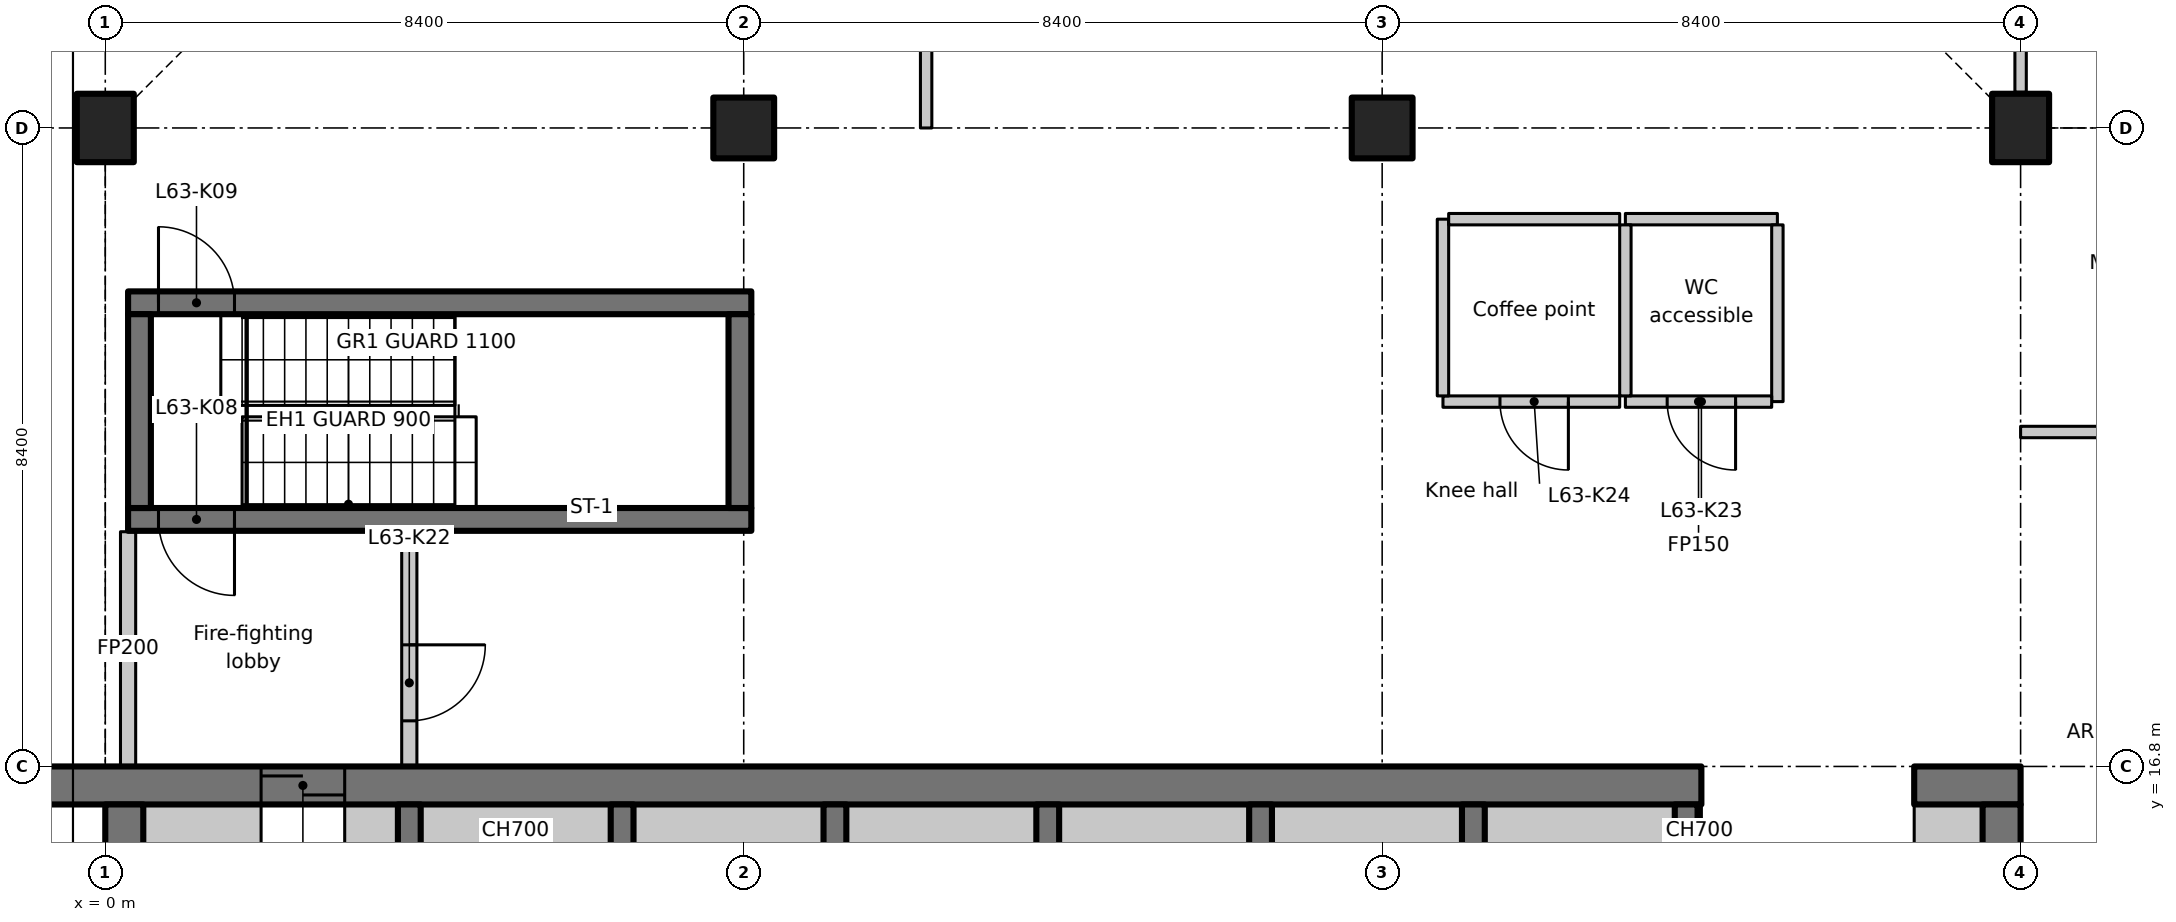
"""IFC4 building model, lengths in metres.
Left out: names, types, materials, properties, quantities, classifications, styles, units other than length and angle.
Written with IfcOpenShell. Run it as: python <this file> out.ifc"""

import sys

from ifc_helpers import new_model, si_unit, direction, frame, frame_2d, origin, origin_2d, place, context, subcontext, project, spatial, polyline, rectangle, outline, extrude, element, fill, save


model = new_model("IFC4")
c1 = context("Model", 3, precision=1e-05, world=origin(), true_north=direction((0.0, 1.0)))
c2 = subcontext(c1, "Body", "Model", "MODEL_VIEW")
j1 = project(units=[si_unit("LENGTHUNIT", "METRE"), si_unit("PLANEANGLEUNIT", "RADIAN")], contexts=[c1])
p1 = place(None, origin())
s1 = spatial("IfcSite", under=j1, at=p1, CompositionType="ELEMENT")
p2 = place(p1, origin())
s2 = spatial("IfcBuilding", under=s1, at=p2, CompositionType="ELEMENT")
p3 = place(p2, frame((0.0, 0.0, 248.1)))
s3 = spatial("IfcBuildingStorey", under=s2, at=p3, CompositionType="ELEMENT", Elevation=248.1)
p4 = place(p3, frame((0.0, 25.2, 0.0), z_axis=(0.0, 0.0, 1.0), x_axis=(1.0, 0.0, 0.0)))
e1 = element("IfcColumn", 1, at=p4, inside=s3, PredefinedType="COLUMN", context=c2, shape_type="SweptSolid", body=[
    extrude(rectangle(XDim=0.75, YDim=0.9, at=origin_2d()), origin(), (0.0, 0.0, 1.0), 3.35),
])
for number, where, z_axis, x_axis in (
    (2, (8.4, 25.2, 0.0), (0.0, 0.0, 1.0), (1.0, 0.0, 0.0)),
    (3, (16.8, 25.2, 0.0), (0.0, 0.0, 1.0), (1.0, 0.0, 0.0)),
):
    element("IfcColumn", number, at=place(p3, frame(where, z_axis=z_axis, x_axis=x_axis)), inside=s3, PredefinedType="COLUMN", context=c2, shape_type="SweptSolid", body=[
        extrude(rectangle(XDim=0.8, YDim=0.8, at=origin_2d()), origin(), (0.0, 0.0, 1.0), 3.35),
    ])
p5 = place(p3, frame((25.2, 25.2, 0.0), z_axis=(0.0, 0.0, 1.0), x_axis=(1.0, 0.0, 0.0)))
e4 = element("IfcColumn", 4, at=p5, inside=s3, PredefinedType="COLUMN", context=c2, shape_type="SweptSolid", body=[
    extrude(rectangle(XDim=0.75, YDim=0.9, at=origin_2d()), origin(), (0.0, 0.0, 1.0), 3.35),
])
p6 = place(p3, frame((-1.1, 16.55, 0.0), z_axis=(0.0, 0.0, 1.0), x_axis=(1.0, 0.0, 0.0)))
e5 = element("IfcWall", 5, at=p6, inside=s3, PredefinedType="SHEAR", context=c2, shape_type="SweptSolid", body=[
    extrude(rectangle(XDim=22.1, YDim=0.5, at=frame_2d((11.05, 0.0))), origin(), (0.0, 0.0, 1.0), 3.35),
])
p7 = place(p6, frame((3.15, 0.0, 0.0)))
e6 = element("IfcOpeningElement", 6, at=p7, cuts=e5, PredefinedType="OPENING", context=c2, shape_type="SweptSolid", body=[
    extrude(rectangle(XDim=1.1, YDim=2.3, at=frame_2d((0.55, 1.15))), frame((0.0, 0.26, 0.0), z_axis=(0.0, -1.0, 0.0), x_axis=(1.0, 0.0, 0.0)), (0.0, 0.0, 1.0), 0.52),
])
p8 = place(p3, frame((23.8, 16.55, 0.0), z_axis=(0.0, 0.0, 1.0), x_axis=(1.0, 0.0, 0.0)))
e7 = element("IfcWall", 7, at=p8, inside=s3, PredefinedType="SHEAR", context=c2, shape_type="SweptSolid", body=[
    extrude(rectangle(XDim=1.4, YDim=0.5, at=frame_2d((0.7, 0.0))), origin(), (0.0, 0.0, 1.0), 3.35),
])
p9 = place(p3, frame((0.25, 7.436, 0.0), z_axis=(0.0, 0.0, 1.0), x_axis=(0.0, 1.0, 0.0)))
e8 = element("IfcWall", 8, at=p9, inside=s3, PredefinedType="SHEAR", context=c2, shape_type="SweptSolid", body=[
    extrude(rectangle(XDim=8.864, YDim=0.5, at=frame_2d((4.432, 0.0))), origin(), (0.0, 0.0, 1.0), 3.35),
])
p10 = place(p3, frame((24.95, 12.6, 0.0), z_axis=(0.0, 0.0, 1.0), x_axis=(0.0, 1.0, 0.0)))
e9 = element("IfcWall", 9, at=p10, inside=s3, PredefinedType="SHEAR", context=c2, shape_type="SweptSolid", body=[
    extrude(rectangle(XDim=3.7, YDim=0.5, at=frame_2d((1.85, 0.0))), origin(), (0.0, 0.0, 1.0), 3.35),
])
p11 = place(p3, frame((0.5, 15.95, 0.0), z_axis=(0.0, 0.0, 1.0), x_axis=(1.0, 0.0, 0.0)))
e10 = element("IfcWall", 10, at=p11, inside=s3, PredefinedType="PARTITIONING", context=c2, shape_type="SweptSolid", body=[
    extrude(rectangle(XDim=1.55, YDim=0.7, at=frame_2d((0.775, 0.0))), origin(), (0.0, 0.0, 1.0), 3.35),
])
p12 = place(p3, frame((23.8, 15.95, 0.0), z_axis=(0.0, 0.0, 1.0), x_axis=(1.0, 0.0, 0.0)))
e11 = element("IfcWall", 11, at=p12, inside=s3, PredefinedType="PARTITIONING", context=c2, shape_type="SweptSolid", body=[
    extrude(rectangle(XDim=0.9, YDim=0.7, at=frame_2d((0.45, 0.0))), origin(), (0.0, 0.0, 1.0), 3.35),
])
for number, where, z_axis, x_axis in (
    (12, (4.0, 12.95, 0.0), (0.0, 0.0, 1.0), (0.0, 1.0, 0.0)),
    (13, (6.8, 12.95, 0.0), (0.0, 0.0, 1.0), (0.0, 1.0, 0.0)),
    (14, (9.6, 12.95, 0.0), (0.0, 0.0, 1.0), (0.0, 1.0, 0.0)),
    (15, (12.4, 12.95, 0.0), (0.0, 0.0, 1.0), (0.0, 1.0, 0.0)),
    (16, (15.2, 12.95, 0.0), (0.0, 0.0, 1.0), (0.0, 1.0, 0.0)),
    (17, (18.0, 12.95, 0.0), (0.0, 0.0, 1.0), (0.0, 1.0, 0.0)),
    (18, (20.8, 12.95, 0.0), (0.0, 0.0, 1.0), (0.0, 1.0, 0.0)),
):
    element("IfcWall", number, at=place(p3, frame(where, z_axis=z_axis, x_axis=x_axis)), inside=s3, PredefinedType="SHEAR", context=c2, shape_type="SweptSolid", body=[
        extrude(rectangle(XDim=3.35, YDim=0.3, at=frame_2d((1.675, 0.0))), origin(), (0.0, 0.0, 1.0), 3.35),
    ])
p13 = place(p3, frame((8.5, 20.05, 0.0), z_axis=(0.0, 0.0, 1.0), x_axis=(-1.0, 0.0, 0.0)))
e19 = element("IfcWall", 19, at=p13, inside=s3, PredefinedType="SHEAR", context=c2, shape_type="SweptSolid", body=[
    extrude(rectangle(XDim=8.2, YDim=0.3, at=frame_2d((4.1, 0.0))), origin(), (0.0, 0.0, 1.0), 3.35),
])
p14 = place(p13, frame((6.8, 0.0, 0.0)))
e20 = element("IfcOpeningElement", 20, at=p14, cuts=e19, PredefinedType="OPENING", context=c2, shape_type="SweptSolid", body=[
    extrude(rectangle(XDim=1.0, YDim=2.1, at=frame_2d((0.5, 1.05))), frame((0.0, 0.16, 0.0), z_axis=(0.0, -1.0, 0.0), x_axis=(1.0, 0.0, 0.0)), (0.0, 0.0, 1.0), 0.32),
])
p15 = place(p3, frame((0.3, 22.9, 0.0), z_axis=(0.0, 0.0, 1.0), x_axis=(1.0, 0.0, 0.0)))
e21 = element("IfcWall", 21, at=p15, inside=s3, PredefinedType="SHEAR", context=c2, shape_type="SweptSolid", body=[
    extrude(rectangle(XDim=8.2, YDim=0.3, at=frame_2d((4.1, 0.0))), origin(), (0.0, 0.0, 1.0), 3.35),
])
p16 = place(p15, frame((0.4, 0.0, 0.0)))
e22 = element("IfcOpeningElement", 22, at=p16, cuts=e21, PredefinedType="OPENING", context=c2, shape_type="SweptSolid", body=[
    extrude(rectangle(XDim=1.0, YDim=2.1, at=frame_2d((0.5, 1.05))), frame((0.0, 0.16, 0.0), z_axis=(0.0, -1.0, 0.0), x_axis=(1.0, 0.0, 0.0)), (0.0, 0.0, 1.0), 0.32),
])
for number, where, z_axis, x_axis in (
    (23, (0.45, 20.2, 0.0), (0.0, 0.0, 1.0), (0.0, 1.0, 0.0)),
    (24, (8.35, 20.2, 0.0), (0.0, 0.0, 1.0), (0.0, 1.0, 0.0)),
):
    element("IfcWall", number, at=place(p3, frame(where, z_axis=z_axis, x_axis=x_axis)), inside=s3, PredefinedType="SHEAR", context=c2, shape_type="SweptSolid", body=[
        extrude(rectangle(XDim=2.55, YDim=0.3, at=frame_2d((1.275, 0.0))), origin(), (0.0, 0.0, 1.0), 3.35),
    ])
p17 = place(p3, frame((0.3, 16.812, 0.0), z_axis=(0.0, 0.0, 1.0), x_axis=(0.0, 1.0, 0.0)))
e25 = element("IfcWall", 25, at=p17, inside=s3, PredefinedType="PARTITIONING", context=c2, shape_type="SweptSolid", body=[
    extrude(rectangle(XDim=3.076, YDim=0.2, at=frame_2d((1.538, 0.0))), origin(), (0.0, 0.0, 1.0), 2.98),
])
p18 = place(p3, frame((4.0, 19.888, 0.0), z_axis=(0.0, 0.0, 1.0), x_axis=(0.0, -1.0, 0.0)))
e26 = element("IfcWall", 26, at=p18, inside=s3, PredefinedType="PARTITIONING", context=c2, shape_type="SweptSolid", body=[
    extrude(rectangle(XDim=3.076, YDim=0.2, at=frame_2d((1.538, 0.0))), origin(), (0.0, 0.0, 1.0), 3.35),
])
p19 = place(p18, frame((1.488, 0.0, 0.0)))
e27 = element("IfcOpeningElement", 27, at=p19, cuts=e26, PredefinedType="OPENING", context=c2, shape_type="SweptSolid", body=[
    extrude(rectangle(XDim=1.0, YDim=2.1, at=frame_2d((0.5, 1.05))), frame((0.0, 0.11, 0.0), z_axis=(0.0, -1.0, 0.0), x_axis=(1.0, 0.0, 0.0)), (0.0, 0.0, 1.0), 0.22),
])
p20 = place(p3, frame((20.0, 24.0, 0.0), z_axis=(0.0, 0.0, 1.0), x_axis=(1.0, 0.0, 0.0)))
e28 = element("IfcWall", 28, at=p20, inside=s3, PredefinedType="PARTITIONING", context=c2, shape_type="SweptSolid", body=[
    extrude(rectangle(XDim=2.0, YDim=0.15, at=frame_2d((1.0, 0.0))), origin(), (0.0, 0.0, 1.0), 3.35),
])
p21 = place(p3, frame((22.0, 23.925, 0.0), z_axis=(0.0, 0.0, 1.0), x_axis=(0.0, -1.0, 0.0)))
e29 = element("IfcWall", 29, at=p21, inside=s3, PredefinedType="PARTITIONING", context=c2, shape_type="SweptSolid", body=[
    extrude(rectangle(XDim=2.325, YDim=0.15, at=frame_2d((1.163, 0.0))), origin(), (0.0, 0.0, 1.0), 3.35),
])
p22 = place(p3, frame((21.925, 21.6, 0.0), z_axis=(0.0, 0.0, 1.0), x_axis=(-1.0, 0.0, 0.0)))
e30 = element("IfcWall", 30, at=p22, inside=s3, PredefinedType="PARTITIONING", context=c2, shape_type="SweptSolid", body=[
    extrude(rectangle(XDim=1.925, YDim=0.15, at=frame_2d((0.962, 0.0))), origin(), (0.0, 0.0, 1.0), 3.35),
])
p23 = place(p22, frame((0.475, 0.0, 0.0)))
e31 = element("IfcOpeningElement", 31, at=p23, cuts=e30, PredefinedType="OPENING", context=c2, shape_type="SweptSolid", body=[
    extrude(rectangle(XDim=0.9, YDim=2.1, at=frame_2d((0.45, 1.05))), frame((0.0, 0.085, 0.0), z_axis=(0.0, -1.0, 0.0), x_axis=(1.0, 0.0, 0.0)), (0.0, 0.0, 1.0), 0.17),
])
p24 = place(p3, frame((20.0, 21.675, 0.0), z_axis=(0.0, 0.0, 1.0), x_axis=(0.0, 1.0, 0.0)))
e32 = element("IfcWall", 32, at=p24, inside=s3, PredefinedType="PARTITIONING", context=c2, shape_type="SweptSolid", body=[
    extrude(rectangle(XDim=2.25, YDim=0.15, at=frame_2d((1.125, 0.0))), origin(), (0.0, 0.0, 1.0), 3.35),
])
p25 = place(p3, frame((19.925, 21.6, 0.0), z_axis=(0.0, 0.0, 1.0), x_axis=(-1.0, 0.0, 0.0)))
e33 = element("IfcWall", 33, at=p25, inside=s3, PredefinedType="PARTITIONING", context=c2, shape_type="SweptSolid", body=[
    extrude(rectangle(XDim=2.325, YDim=0.15, at=frame_2d((1.163, 0.0))), origin(), (0.0, 0.0, 1.0), 3.35),
])
p26 = place(p25, frame((0.675, 0.0, 0.0)))
e34 = element("IfcOpeningElement", 34, at=p26, cuts=e33, PredefinedType="OPENING", context=c2, shape_type="SweptSolid", body=[
    extrude(rectangle(XDim=0.9, YDim=2.1, at=frame_2d((0.45, 1.05))), frame((0.0, 0.085, 0.0), z_axis=(0.0, -1.0, 0.0), x_axis=(1.0, 0.0, 0.0)), (0.0, 0.0, 1.0), 0.17),
])
p27 = place(p3, frame((17.6, 21.675, 0.0), z_axis=(0.0, 0.0, 1.0), x_axis=(0.0, 1.0, 0.0)))
e35 = element("IfcWall", 35, at=p27, inside=s3, PredefinedType="PARTITIONING", context=c2, shape_type="SweptSolid", body=[
    extrude(rectangle(XDim=2.325, YDim=0.15, at=frame_2d((1.163, 0.0))), origin(), (0.0, 0.0, 1.0), 3.35),
])
p28 = place(p3, frame((17.675, 24.0, 0.0), z_axis=(0.0, 0.0, 1.0), x_axis=(1.0, 0.0, 0.0)))
e36 = element("IfcWall", 36, at=p28, inside=s3, PredefinedType="PARTITIONING", context=c2, shape_type="SweptSolid", body=[
    extrude(rectangle(XDim=2.25, YDim=0.15, at=frame_2d((1.125, 0.0))), origin(), (0.0, 0.0, 1.0), 3.35),
])
p29 = place(p3, frame((3.15, 15.95, 0.0), z_axis=(0.0, 0.0, 1.0), x_axis=(1.0, 0.0, 0.0)))
e37 = element("IfcWall", 37, at=p29, inside=s3, PredefinedType="PARTITIONING", context=c2, shape_type="SweptSolid", body=[
    extrude(rectangle(XDim=0.7, YDim=0.7, at=frame_2d((0.35, 0.0))), origin(), (0.0, 0.0, 1.0), 3.35),
])
for number, where, z_axis, x_axis in (
    (38, (4.15, 15.95, 0.0), (0.0, 0.0, 1.0), (1.0, 0.0, 0.0)),
    (39, (6.95, 15.95, 0.0), (0.0, 0.0, 1.0), (1.0, 0.0, 0.0)),
    (40, (9.75, 15.95, 0.0), (0.0, 0.0, 1.0), (1.0, 0.0, 0.0)),
    (41, (12.55, 15.95, 0.0), (0.0, 0.0, 1.0), (1.0, 0.0, 0.0)),
    (42, (15.35, 15.95, 0.0), (0.0, 0.0, 1.0), (1.0, 0.0, 0.0)),
    (43, (18.15, 15.95, 0.0), (0.0, 0.0, 1.0), (1.0, 0.0, 0.0)),
):
    element("IfcWall", number, at=place(p3, frame(where, z_axis=z_axis, x_axis=x_axis)), inside=s3, PredefinedType="PARTITIONING", context=c2, shape_type="SweptSolid", body=[
        extrude(rectangle(XDim=2.5, YDim=0.7, at=frame_2d((1.25, 0.0))), origin(), (0.0, 0.0, 1.0), 3.35),
    ])
p30 = place(p3, frame((20.95, 15.95, 0.0), z_axis=(0.0, 0.0, 1.0), x_axis=(1.0, 0.0, 0.0)))
e44 = element("IfcWall", 44, at=p30, inside=s3, PredefinedType="PARTITIONING", context=c2, shape_type="SweptSolid", body=[
    extrude(rectangle(XDim=0.05, YDim=0.7, at=frame_2d((0.025, 0.0))), origin(), (0.0, 0.0, 1.0), 3.35),
])
p31 = place(p3, frame((25.2, 21.2, 0.0), z_axis=(0.0, 0.0, 1.0), x_axis=(1.0, 0.0, 0.0)))
e45 = element("IfcWall", 45, at=p31, inside=s3, PredefinedType="PARTITIONING", context=c2, shape_type="SweptSolid", body=[
    extrude(rectangle(XDim=4.2, YDim=0.15, at=frame_2d((2.1, 0.0))), origin(), (0.0, 0.0, 1.0), 3.33),
])
p32 = place(p31, frame((1.5, 0.0, 0.0)))
e46 = element("IfcOpeningElement", 46, at=p32, cuts=e45, PredefinedType="OPENING", context=c2, shape_type="SweptSolid", body=[
    extrude(rectangle(XDim=1.0, YDim=2.1, at=frame_2d((0.5, 1.05))), frame((0.0, 0.085, 0.0), z_axis=(0.0, -1.0, 0.0), x_axis=(1.0, 0.0, 0.0)), (0.0, 0.0, 1.0), 0.17),
])
p33 = place(p3, frame((25.2, 25.67, 0.0), z_axis=(0.0, 0.0, 1.0), x_axis=(0.0, 1.0, 0.0)))
e47 = element("IfcWall", 47, at=p33, inside=s3, PredefinedType="PARTITIONING", context=c2, shape_type="SweptSolid", body=[
    extrude(rectangle(XDim=4.487, YDim=0.15, at=frame_2d((2.243, 0.0))), origin(), (0.0, 0.0, 1.0), 2.98),
])
p34 = place(p3, frame((10.8, 25.2, 0.0), z_axis=(0.0, 0.0, 1.0), x_axis=(0.0, 1.0, 0.0)))
e48 = element("IfcWall", 48, at=p34, inside=s3, PredefinedType="PARTITIONING", context=c2, shape_type="SweptSolid", body=[
    extrude(outline(polyline([(0.0, 0.0), (8.4, 0.0), (8.4, 2.98), (7.952, 2.98), (7.95, 3.33), (0.0, 3.33), (0.0, 0.0)])), frame((0.0, 0.075, 0.0), z_axis=(0.0, -1.0, 0.0), x_axis=(1.0, 0.0, 0.0)), (0.0, 0.0, 1.0), 0.15),
])
p35 = place(p34, frame((3.3, 0.0, 0.0)))
e49 = element("IfcOpeningElement", 49, at=p35, cuts=e48, PredefinedType="OPENING", context=c2, shape_type="SweptSolid", body=[
    extrude(rectangle(XDim=1.6, YDim=2.1, at=frame_2d((0.8, 1.05))), frame((0.0, 0.085, 0.0), z_axis=(0.0, -1.0, 0.0), x_axis=(1.0, 0.0, 0.0)), (0.0, 0.0, 1.0), 0.17),
])
p36 = place(p7, origin())
e50 = element("IfcDoor", 50, at=p36, inside=s3, OperationType="SLIDING_TO_LEFT", PredefinedType="DOOR", context=c2, shape_type="SweptSolid", body=[
    extrude(rectangle(XDim=1.1, YDim=2.3, at=frame_2d((0.55, 1.15))), frame((0.0, 0.025, 0.0), z_axis=(0.0, -1.0, 0.0), x_axis=(1.0, 0.0, 0.0)), (0.0, 0.0, 1.0), 0.05),
])
fill(e6, e50)
p37 = place(p14, origin())
e51 = element("IfcDoor", 51, at=p37, inside=s3, OperationType="SINGLE_SWING_LEFT", PredefinedType="DOOR", context=c2, shape_type="SweptSolid", body=[
    extrude(rectangle(XDim=1.0, YDim=2.1, at=frame_2d((0.5, 1.05))), frame((0.0, 0.025, 0.0), z_axis=(0.0, -1.0, 0.0), x_axis=(1.0, 0.0, 0.0)), (0.0, 0.0, 1.0), 0.05),
])
fill(e20, e51)
p38 = place(p16, origin())
e52 = element("IfcDoor", 52, at=p38, inside=s3, OperationType="SINGLE_SWING_RIGHT", PredefinedType="DOOR", context=c2, shape_type="SweptSolid", body=[
    extrude(rectangle(XDim=1.0, YDim=2.1, at=frame_2d((0.5, 1.05))), frame((0.0, 0.025, 0.0), z_axis=(0.0, -1.0, 0.0), x_axis=(1.0, 0.0, 0.0)), (0.0, 0.0, 1.0), 0.05),
])
fill(e22, e52)
p39 = place(p19, origin())
e53 = element("IfcDoor", 53, at=p39, inside=s3, OperationType="SINGLE_SWING_LEFT", PredefinedType="DOOR", context=c2, shape_type="SweptSolid", body=[
    extrude(rectangle(XDim=1.0, YDim=2.1, at=frame_2d((0.5, 1.05))), frame((0.0, 0.025, 0.0), z_axis=(0.0, -1.0, 0.0), x_axis=(1.0, 0.0, 0.0)), (0.0, 0.0, 1.0), 0.05),
])
fill(e27, e53)
p40 = place(p23, origin())
e54 = element("IfcDoor", 54, at=p40, inside=s3, OperationType="SINGLE_SWING_RIGHT", PredefinedType="DOOR", context=c2, shape_type="SweptSolid", body=[
    extrude(rectangle(XDim=0.9, YDim=2.1, at=frame_2d((0.45, 1.05))), frame((0.0, 0.025, 0.0), z_axis=(0.0, -1.0, 0.0), x_axis=(1.0, 0.0, 0.0)), (0.0, 0.0, 1.0), 0.05),
])
fill(e31, e54)
p41 = place(p26, origin())
e55 = element("IfcDoor", 55, at=p41, inside=s3, OperationType="SINGLE_SWING_LEFT", PredefinedType="DOOR", context=c2, shape_type="SweptSolid", body=[
    extrude(rectangle(XDim=0.9, YDim=2.1, at=frame_2d((0.45, 1.05))), frame((0.0, 0.025, 0.0), z_axis=(0.0, -1.0, 0.0), x_axis=(1.0, 0.0, 0.0)), (0.0, 0.0, 1.0), 0.05),
])
fill(e34, e55)
save(model, sys.argv[1])
